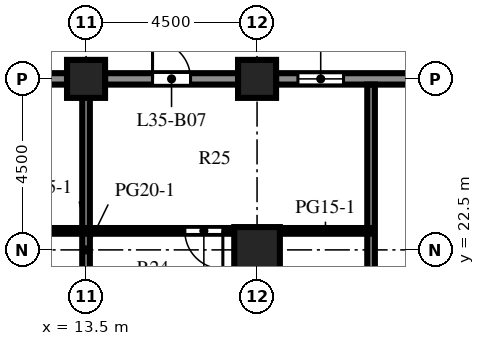
"""IFC4 building model, lengths in metres.
Left out: names, types, materials, properties, quantities, classifications, styles, units other than length and angle.
Written with IfcOpenShell. Run it as: python <this file> out.ifc"""

import sys

from ifc_helpers import new_model, si_unit, direction, frame, frame_2d, origin, origin_2d, place, context, subcontext, project, spatial, rectangle, extrude, element, fill, save


model = new_model("IFC4")
c1 = context("Model", 3, precision=1e-05, world=origin(), true_north=direction((0.0, 1.0)))
c2 = subcontext(c1, "Body", "Model", "MODEL_VIEW")
j1 = project(units=[si_unit("LENGTHUNIT", "METRE"), si_unit("PLANEANGLEUNIT", "RADIAN")], contexts=[c1])
p1 = place(None, origin())
s1 = spatial("IfcSite", under=j1, at=p1, CompositionType="ELEMENT")
p2 = place(p1, origin())
s2 = spatial("IfcBuilding", under=s1, at=p2, CompositionType="ELEMENT")
p3 = place(p2, frame((0.0, 0.0, 156.8)))
s3 = spatial("IfcBuildingStorey", under=s2, at=p3, CompositionType="ELEMENT", Elevation=156.8)
for number, where, z_axis, x_axis in (
    (1, (13.5, 27.0, 0.0), (0.0, 0.0, 1.0), (1.0, 0.0, 0.0)),
    (2, (18.0, 27.0, 0.0), (0.0, 0.0, 1.0), (1.0, 0.0, 0.0)),
):
    element("IfcColumn", number, at=place(p3, frame(where, z_axis=z_axis, x_axis=x_axis)), inside=s3, PredefinedType="COLUMN", context=c2, shape_type="SweptSolid", body=[
        extrude(rectangle(XDim=1.0, YDim=1.0, at=origin_2d()), origin(), (0.0, 0.0, 1.0), 4.1),
    ])
p4 = place(p3, frame((18.0, 22.5, 0.0), z_axis=(0.0, 0.0, 1.0), x_axis=(1.0, 0.0, 0.0)))
e3 = element("IfcColumn", 3, at=p4, inside=s3, PredefinedType="COLUMN", context=c2, shape_type="SweptSolid", body=[
    extrude(rectangle(XDim=1.2, YDim=1.2, at=origin_2d()), origin(), (0.0, 0.0, 1.0), 4.1),
])
p5 = place(p3, frame((18.5, 27.0, 0.0), z_axis=(0.0, 0.0, 1.0), x_axis=(1.0, 0.0, 0.0)))
e4 = element("IfcWall", 4, at=p5, inside=s3, PredefinedType="SOLIDWALL", context=c2, shape_type="SweptSolid", body=[
    extrude(rectangle(XDim=3.5, YDim=0.3, at=frame_2d((1.75, 0.0))), origin(), (0.0, 0.0, 1.0), 2.85),
])
p6 = place(p5, frame((0.575, 0.0, 0.8)))
e5 = element("IfcOpeningElement", 5, at=p6, cuts=e4, PredefinedType="OPENING", context=c2, shape_type="SweptSolid", body=[
    extrude(rectangle(XDim=1.2, YDim=1.7, at=frame_2d((0.6, 0.85))), frame((0.0, 0.16, 0.0), z_axis=(0.0, -1.0, 0.0), x_axis=(1.0, 0.0, 0.0)), (0.0, 0.0, 1.0), 0.32),
])
p7 = place(p3, frame((14.0, 27.0, 0.0), z_axis=(0.0, 0.0, 1.0), x_axis=(1.0, 0.0, 0.0)))
e6 = element("IfcWall", 6, at=p7, inside=s3, PredefinedType="SOLIDWALL", context=c2, shape_type="SweptSolid", body=[
    extrude(rectangle(XDim=3.5, YDim=0.3, at=frame_2d((1.75, 0.0))), origin(), (0.0, 0.0, 1.0), 2.85),
])
p8 = place(p7, frame((1.25, 0.0, 0.0)))
e7 = element("IfcOpeningElement", 7, at=p8, cuts=e6, PredefinedType="OPENING", context=c2, shape_type="SweptSolid", body=[
    extrude(rectangle(XDim=1.0, YDim=2.2, at=frame_2d((0.5, 1.1))), frame((0.0, 0.16, 0.0), z_axis=(0.0, -1.0, 0.0), x_axis=(1.0, 0.0, 0.0)), (0.0, 0.0, 1.0), 0.32),
])
p9 = place(p3, frame((9.5, 27.0, 0.0), z_axis=(0.0, 0.0, 1.0), x_axis=(1.0, 0.0, 0.0)))
e8 = element("IfcWall", 8, at=p9, inside=s3, PredefinedType="SOLIDWALL", context=c2, shape_type="SweptSolid", body=[
    extrude(rectangle(XDim=3.5, YDim=0.3, at=frame_2d((1.75, 0.0))), origin(), (0.0, 0.0, 1.0), 2.85),
])
p10 = place(p9, frame((0.55, 0.0, 0.8)))
e9 = element("IfcOpeningElement", 9, at=p10, cuts=e8, PredefinedType="OPENING", context=c2, shape_type="SweptSolid", body=[
    extrude(rectangle(XDim=2.4, YDim=1.7, at=frame_2d((1.2, 0.85))), frame((0.0, 0.16, 0.0), z_axis=(0.0, -1.0, 0.0), x_axis=(1.0, 0.0, 0.0)), (0.0, 0.0, 1.0), 0.32),
])
p11 = place(p3, frame((13.5, 18.5, 0.0), z_axis=(0.0, 0.0, 1.0), x_axis=(0.0, 1.0, 0.0)))
e10 = element("IfcWall", 10, at=p11, inside=s3, PredefinedType="PARTITIONING", context=c2, shape_type="SweptSolid", body=[
    extrude(rectangle(XDim=8.0, YDim=0.2, at=frame_2d((4.0, 0.0))), origin(), (0.0, 0.0, 1.0), 3.65),
])
p12 = place(p3, frame((21.0, 26.85, 0.0), z_axis=(0.0, 0.0, 1.0), x_axis=(0.0, -1.0, 0.0)))
e11 = element("IfcWall", 11, at=p12, inside=s3, PredefinedType="PARTITIONING", context=c2, shape_type="SweptSolid", body=[
    extrude(rectangle(XDim=20.6, YDim=0.2, at=frame_2d((10.3, 0.0))), origin(), (0.0, 0.0, 1.0), 3.65),
])
p13 = place(p12, frame((11.25, 0.0, 0.0)))
e12 = element("IfcOpeningElement", 12, at=p13, cuts=e11, PredefinedType="OPENING", context=c2, shape_type="SweptSolid", body=[
    extrude(rectangle(XDim=1.0, YDim=2.1, at=frame_2d((0.5, 1.05))), frame((0.0, 0.11, 0.0), z_axis=(0.0, -1.0, 0.0), x_axis=(1.0, 0.0, 0.0)), (0.0, 0.0, 1.0), 0.22),
])
p14 = place(p3, frame((9.6, 23.0, 0.0), z_axis=(0.0, 0.0, 1.0), x_axis=(1.0, 0.0, 0.0)))
e13 = element("IfcWall", 13, at=p14, inside=s3, PredefinedType="PARTITIONING", context=c2, shape_type="SweptSolid", body=[
    extrude(rectangle(XDim=7.8, YDim=0.15, at=frame_2d((3.9, 0.0))), origin(), (0.0, 0.0, 1.0), 3.65),
])
p15 = place(p14, frame((0.25, 0.0, 0.0)))
e14 = element("IfcOpeningElement", 14, at=p15, cuts=e13, PredefinedType="OPENING", context=c2, shape_type="SweptSolid", body=[
    extrude(rectangle(XDim=1.0, YDim=2.1, at=frame_2d((0.5, 1.05))), frame((0.0, 0.085, 0.0), z_axis=(0.0, -1.0, 0.0), x_axis=(1.0, 0.0, 0.0)), (0.0, 0.0, 1.0), 0.17),
])
p16 = place(p14, frame((6.5, 0.0, 0.0)))
e15 = element("IfcOpeningElement", 15, at=p16, cuts=e13, PredefinedType="OPENING", context=c2, shape_type="SweptSolid", body=[
    extrude(rectangle(XDim=1.0, YDim=2.1, at=frame_2d((0.5, 1.05))), frame((0.0, 0.085, 0.0), z_axis=(0.0, -1.0, 0.0), x_axis=(1.0, 0.0, 0.0)), (0.0, 0.0, 1.0), 0.17),
])
p17 = place(p3, frame((18.6, 23.0, 0.0), z_axis=(0.0, 0.0, 1.0), x_axis=(1.0, 0.0, 0.0)))
e16 = element("IfcWall", 16, at=p17, inside=s3, PredefinedType="PARTITIONING", context=c2, shape_type="SweptSolid", body=[
    extrude(rectangle(XDim=2.4, YDim=0.15, at=frame_2d((1.2, 0.0))), origin(), (0.0, 0.0, 1.0), 3.65),
])
p18 = place(p6, origin())
e17 = element("IfcWindow", 17, at=p18, inside=s3, PartitioningType="SINGLE_PANEL", PredefinedType="WINDOW", context=c2, shape_type="SweptSolid", body=[
    extrude(rectangle(XDim=1.2, YDim=1.7, at=frame_2d((0.6, 0.85))), frame((0.0, 0.03, 0.0), z_axis=(0.0, -1.0, 0.0), x_axis=(1.0, 0.0, 0.0)), (0.0, 0.0, 1.0), 0.06),
])
fill(e5, e17)
p19 = place(p8, origin())
e18 = element("IfcDoor", 18, at=p19, inside=s3, OperationType="SINGLE_SWING_LEFT", PredefinedType="DOOR", context=c2, shape_type="SweptSolid", body=[
    extrude(rectangle(XDim=1.0, YDim=2.2, at=frame_2d((0.5, 1.1))), frame((0.0, 0.025, 0.0), z_axis=(0.0, -1.0, 0.0), x_axis=(1.0, 0.0, 0.0)), (0.0, 0.0, 1.0), 0.05),
])
fill(e7, e18)
p20 = place(p16, origin())
e19 = element("IfcDoor", 19, at=p20, inside=s3, OperationType="SINGLE_SWING_RIGHT", PredefinedType="DOOR", context=c2, shape_type="SweptSolid", body=[
    extrude(rectangle(XDim=1.0, YDim=2.1, at=frame_2d((0.5, 1.05))), frame((0.0, 0.025, 0.0), z_axis=(0.0, -1.0, 0.0), x_axis=(1.0, 0.0, 0.0)), (0.0, 0.0, 1.0), 0.05),
])
fill(e15, e19)
save(model, sys.argv[1])
